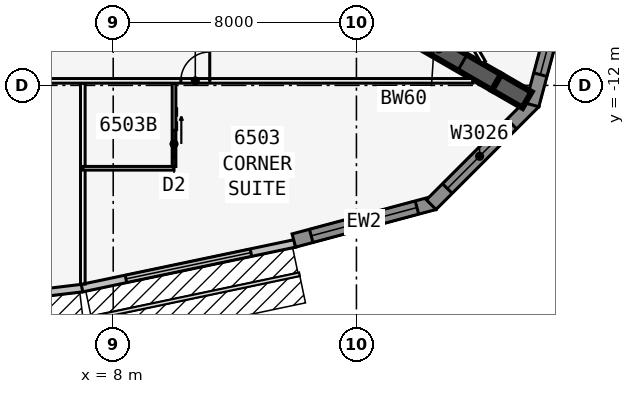
"""IFC4 building model, lengths in metres.
Left out: names, types, materials, properties, quantities, classifications, styles, units other than length and angle.
Written with IfcOpenShell. Run it as: python <this file> out.ifc"""

import sys

from ifc_helpers import new_model, si_unit, direction, frame, frame_2d, origin, place, context, subcontext, project, spatial, polyline, rectangle, outline, extrude, element, fill, save


model = new_model("IFC4")
c1 = context("Model", 3, precision=1e-05, world=origin(), true_north=direction((0.0, 1.0)))
c2 = subcontext(c1, "Body", "Model", "MODEL_VIEW")
j1 = project(units=[si_unit("LENGTHUNIT", "METRE"), si_unit("PLANEANGLEUNIT", "RADIAN")], contexts=[c1])
p1 = place(None, origin())
s1 = spatial("IfcSite", under=j1, at=p1, CompositionType="ELEMENT")
p2 = place(p1, origin())
s2 = spatial("IfcBuilding", under=s1, at=p2, CompositionType="ELEMENT")
p3 = place(p2, frame((0.0, 0.0, 246.5)))
s3 = spatial("IfcBuildingStorey", under=s2, at=p3, CompositionType="ELEMENT", Elevation=246.5)
p4 = place(p3, frame((16.5, -9.526, 0.0), z_axis=(0.0, 0.0, 1.0), x_axis=(0.866031398331, -0.499989616998, 0.0)))
e1 = element("IfcWall", 1, at=p4, inside=s3, PredefinedType="SHEAR", context=c2, shape_type="SweptSolid", body=[
    extrude(rectangle(XDim=4.746, YDim=0.6, at=frame_2d((2.373, 0.0))), origin(), (0.0, 0.0, 1.0), 3.6),
])
p5 = place(p4, frame((1.65, 0.0, 0.0)))
e2 = element("IfcOpeningElement", 2, at=p5, cuts=e1, PredefinedType="OPENING", context=c2, shape_type="SweptSolid", body=[
    extrude(rectangle(XDim=1.8, YDim=2.13, at=frame_2d((0.9, 1.065))), frame((0.0, 0.31, 0.0), z_axis=(0.0, -1.0, 0.0), x_axis=(1.0, 0.0, 0.0)), (0.0, 0.0, 1.0), 0.62),
])
p6 = place(p3, frame((20.61, -11.899, 0.0), z_axis=(0.0, 0.0, 1.0), x_axis=(0.866009537788, -0.500027479704, 0.0)))
e3 = element("IfcWall", 3, at=p6, inside=s3, PredefinedType="SHEAR", context=c2, shape_type="SweptSolid", body=[
    extrude(rectangle(XDim=1.155, YDim=0.6, at=frame_2d((0.577, 0.0))), origin(), (0.0, 0.0, 1.0), 3.6),
])
p7 = place(p3, frame((4.985, -18.906, 0.0), z_axis=(0.0, 0.0, 1.0), x_axis=(0.992877411981, 0.119140441403, 0.0)))
e4 = element("IfcWall", 4, at=p7, inside=s3, PredefinedType="STANDARD", context=c2, shape_type="SweptSolid", body=[
    extrude(rectangle(XDim=2.014, YDim=0.25, at=frame_2d((1.007, 0.0))), origin(), (0.0, 0.0, 1.0), 3.435),
])
p8 = place(p3, frame((6.974, -18.668, 0.0), z_axis=(0.0, 0.0, 1.0), x_axis=(0.978654320409, 0.205513311355, 0.0)))
e5 = element("IfcWall", 5, at=p8, inside=s3, PredefinedType="STANDARD", context=c2, shape_type="SweptSolid", body=[
    extrude(rectangle(XDim=7.153, YDim=0.25, at=frame_2d((3.576, 0.0))), origin(), (0.0, 0.0, 1.0), 3.435),
])
p9 = place(p8, frame((1.476, 0.0, 0.45)))
e6 = element("IfcOpeningElement", 6, at=p9, cuts=e5, PredefinedType="OPENING", context=c2, shape_type="SweptSolid", body=[
    extrude(rectangle(XDim=4.2, YDim=2.6, at=frame_2d((2.1, 1.3))), frame((0.0, 0.135, 0.0), z_axis=(0.0, -1.0, 0.0), x_axis=(1.0, 0.0, 0.0)), (0.0, 0.0, 1.0), 0.27),
])
p10 = place(p3, frame((13.942, -17.103, 0.0), z_axis=(0.0, 0.0, 1.0), x_axis=(0.965913862671, 0.258863689806, 0.0)))
e7 = element("IfcWall", 7, at=p10, inside=s3, PredefinedType="SOLIDWALL", context=c2, shape_type="SweptSolid", body=[
    extrude(rectangle(XDim=4.782, YDim=0.45, at=frame_2d((2.391, 0.0))), origin(), (0.0, 0.0, 1.0), 3.435),
])
p11 = place(p10, frame((0.591, 0.0, 0.45)))
e8 = element("IfcOpeningElement", 8, at=p11, cuts=e7, PredefinedType="OPENING", context=c2, shape_type="SweptSolid", body=[
    extrude(rectangle(XDim=3.6, YDim=2.6, at=frame_2d((1.8, 1.3))), frame((0.0, 0.235, 0.0), z_axis=(0.0, -1.0, 0.0), x_axis=(1.0, 0.0, 0.0)), (0.0, 0.0, 1.0), 0.47),
])
p12 = place(p3, frame((18.46, -15.924, 0.0), z_axis=(0.0, 0.0, 1.0), x_axis=(0.707081252484, 0.707132308968, 0.0)))
e9 = element("IfcWall", 9, at=p12, inside=s3, PredefinedType="SOLIDWALL", context=c2, shape_type="SweptSolid", body=[
    extrude(outline(polyline([(4.782, 0.225), (4.723, 0.225), (4.375, 0.132), (4.351, 0.225), (0.0, 0.225), (0.0, -0.225), (4.782, -0.225), (4.782, 0.225)])), origin(), (0.0, 0.0, 1.0), 3.435),
])
p13 = place(p12, frame((0.75, 0.0, 0.45)))
e10 = element("IfcOpeningElement", 10, at=p13, cuts=e9, PredefinedType="OPENING", context=c2, shape_type="SweptSolid", body=[
    extrude(rectangle(XDim=3.0, YDim=2.6, at=frame_2d((1.5, 1.3))), frame((0.0, 0.235, 0.0), z_axis=(0.0, -1.0, 0.0), x_axis=(1.0, 0.0, 0.0)), (0.0, 0.0, 1.0), 0.47),
])
p14 = place(p3, frame((21.783, -12.644, 0.0), z_axis=(0.0, 0.0, 1.0), x_axis=(0.25880328844, 0.965930048136, 0.0)))
e11 = element("IfcWall", 11, at=p14, inside=s3, PredefinedType="SOLIDWALL", context=c2, shape_type="SweptSolid", body=[
    extrude(outline(polyline([(4.782, 0.225), (0.431, 0.225), (0.406, 0.132), (0.06, 0.225), (0.0, 0.225), (0.0, -0.225), (4.782, -0.225), (4.782, 0.225)])), origin(), (0.0, 0.0, 1.0), 3.435),
])
p15 = place(p14, frame((1.031, 0.0, 0.45)))
e12 = element("IfcOpeningElement", 12, at=p15, cuts=e11, PredefinedType="OPENING", context=c2, shape_type="SweptSolid", body=[
    extrude(rectangle(XDim=3.0, YDim=2.6, at=frame_2d((1.5, 1.3))), frame((0.0, 0.235, 0.0), z_axis=(0.0, -1.0, 0.0), x_axis=(1.0, 0.0, 0.0)), (0.0, 0.0, 1.0), 0.47),
])
p16 = place(p3, frame((-19.827, -11.851, 0.0), z_axis=(0.0, 0.0, 1.0), x_axis=(1.0, 0.0, 0.0)))
e13 = element("IfcWall", 13, at=p16, inside=s3, PredefinedType="PARTITIONING", context=c2, shape_type="SweptSolid", body=[
    extrude(rectangle(XDim=39.654, YDim=0.15, at=frame_2d((19.827, 0.0))), origin(), (0.0, 0.0, 1.0), 3.435),
])
p17 = place(p16, frame((8.652, 0.0, 0.0)))
e14 = element("IfcOpeningElement", 14, at=p17, cuts=e13, PredefinedType="OPENING", context=c2, shape_type="SweptSolid", body=[
    extrude(rectangle(XDim=0.95, YDim=2.13, at=frame_2d((0.475, 1.065))), frame((0.0, 0.085, 0.0), z_axis=(0.0, -1.0, 0.0), x_axis=(1.0, 0.0, 0.0)), (0.0, 0.0, 1.0), 0.17),
])
p18 = place(p16, frame((15.827, 0.0, 0.0)))
e15 = element("IfcOpeningElement", 15, at=p18, cuts=e13, PredefinedType="OPENING", context=c2, shape_type="SweptSolid", body=[
    extrude(rectangle(XDim=1.0, YDim=2.13, at=frame_2d((0.5, 1.065))), frame((0.0, 0.085, 0.0), z_axis=(0.0, -1.0, 0.0), x_axis=(1.0, 0.0, 0.0)), (0.0, 0.0, 1.0), 0.17),
])
p19 = place(p16, frame((23.052, 0.0, 0.0)))
e16 = element("IfcOpeningElement", 16, at=p19, cuts=e13, PredefinedType="OPENING", context=c2, shape_type="SweptSolid", body=[
    extrude(rectangle(XDim=0.95, YDim=2.13, at=frame_2d((0.475, 1.065))), frame((0.0, 0.085, 0.0), z_axis=(0.0, -1.0, 0.0), x_axis=(1.0, 0.0, 0.0)), (0.0, 0.0, 1.0), 0.17),
])
p20 = place(p16, frame((30.052, 0.0, 0.0)))
e17 = element("IfcOpeningElement", 17, at=p20, cuts=e13, PredefinedType="OPENING", context=c2, shape_type="SweptSolid", body=[
    extrude(rectangle(XDim=0.95, YDim=2.13, at=frame_2d((0.475, 1.065))), frame((0.0, 0.085, 0.0), z_axis=(0.0, -1.0, 0.0), x_axis=(1.0, 0.0, 0.0)), (0.0, 0.0, 1.0), 0.17),
])
p21 = place(p3, frame((7.0, -11.926, 0.0), z_axis=(0.0, 0.0, 1.0), x_axis=(0.0, -1.0, 0.0)))
e18 = element("IfcWall", 18, at=p21, inside=s3, PredefinedType="PARTITIONING", context=c2, shape_type="SweptSolid", body=[
    extrude(rectangle(XDim=6.609, YDim=0.15, at=frame_2d((3.304, 0.0))), origin(), (0.0, 0.0, 1.0), 2.678),
])
p22 = place(p3, frame((7.0, -14.726, 0.0), z_axis=(0.0, 0.0, 1.0), x_axis=(1.0, 0.0, 0.0)))
e19 = element("IfcWall", 19, at=p22, inside=s3, PredefinedType="PLUMBINGWALL", context=c2, shape_type="SweptSolid", body=[
    extrude(rectangle(XDim=3.0, YDim=0.12, at=frame_2d((1.5, 0.0))), origin(), (0.0, 0.0, 1.0), 3.435),
])
p23 = place(p3, frame((10.0, -11.926, 0.0), z_axis=(0.0, 0.0, 1.0), x_axis=(0.0, -1.0, 0.0)))
e20 = element("IfcWall", 20, at=p23, inside=s3, PredefinedType="PLUMBINGWALL", context=c2, shape_type="SweptSolid", body=[
    extrude(rectangle(XDim=2.74, YDim=0.12, at=frame_2d((1.37, 0.0))), origin(), (0.0, 0.0, 1.0), 3.435),
])
p24 = place(p23, frame((1.55, 0.0, 0.0)))
e21 = element("IfcOpeningElement", 21, at=p24, cuts=e20, PredefinedType="OPENING", context=c2, shape_type="SweptSolid", body=[
    extrude(rectangle(XDim=0.9, YDim=2.13, at=frame_2d((0.45, 1.065))), frame((0.0, 0.07, 0.0), z_axis=(0.0, -1.0, 0.0), x_axis=(1.0, 0.0, 0.0)), (0.0, 0.0, 1.0), 0.14),
])
p25 = place(p3, frame((20.177, -11.245, 0.0), z_axis=(0.0, 0.0, 1.0), x_axis=(-0.49999979161, 0.866025524098, 0.0)))
e22 = element("IfcWall", 22, at=p25, inside=s3, PredefinedType="PARTITIONING", context=c2, shape_type="SweptSolid", body=[
    extrude(rectangle(XDim=12.827, YDim=0.15, at=frame_2d((6.414, 0.0))), origin(), (0.0, 0.0, 1.0), 3.435),
])
p26 = place(p25, frame((8.652, 0.0, 0.0)))
e23 = element("IfcOpeningElement", 23, at=p26, cuts=e22, PredefinedType="OPENING", context=c2, shape_type="SweptSolid", body=[
    extrude(rectangle(XDim=0.95, YDim=2.13, at=frame_2d((0.475, 1.065))), frame((0.0, 0.085, 0.0), z_axis=(0.0, -1.0, 0.0), x_axis=(1.0, 0.0, 0.0)), (0.0, 0.0, 1.0), 0.17),
])
p27 = place(p9, origin())
e24 = element("IfcWindow", 24, at=p27, inside=s3, PartitioningType="SINGLE_PANEL", PredefinedType="WINDOW", context=c2, shape_type="SweptSolid", body=[
    extrude(rectangle(XDim=4.2, YDim=2.6, at=frame_2d((2.1, 1.3))), frame((0.0, 0.03, 0.0), z_axis=(0.0, -1.0, 0.0), x_axis=(1.0, 0.0, 0.0)), (0.0, 0.0, 1.0), 0.06),
])
fill(e6, e24)
p28 = place(p11, origin())
e25 = element("IfcWindow", 25, at=p28, inside=s3, PartitioningType="SINGLE_PANEL", PredefinedType="WINDOW", context=c2, shape_type="SweptSolid", body=[
    extrude(rectangle(XDim=3.6, YDim=2.6, at=frame_2d((1.8, 1.3))), frame((0.0, 0.03, 0.0), z_axis=(0.0, -1.0, 0.0), x_axis=(1.0, 0.0, 0.0)), (0.0, 0.0, 1.0), 0.06),
])
fill(e8, e25)
p29 = place(p13, origin())
e26 = element("IfcWindow", 26, at=p29, inside=s3, PartitioningType="SINGLE_PANEL", PredefinedType="WINDOW", context=c2, shape_type="SweptSolid", body=[
    extrude(rectangle(XDim=3.0, YDim=2.6, at=frame_2d((1.5, 1.3))), frame((0.0, 0.03, 0.0), z_axis=(0.0, -1.0, 0.0), x_axis=(1.0, 0.0, 0.0)), (0.0, 0.0, 1.0), 0.06),
])
fill(e10, e26)
p30 = place(p15, origin())
e27 = element("IfcWindow", 27, at=p30, inside=s3, PartitioningType="SINGLE_PANEL", PredefinedType="WINDOW", context=c2, shape_type="SweptSolid", body=[
    extrude(rectangle(XDim=3.0, YDim=2.6, at=frame_2d((1.5, 1.3))), frame((0.0, 0.03, 0.0), z_axis=(0.0, -1.0, 0.0), x_axis=(1.0, 0.0, 0.0)), (0.0, 0.0, 1.0), 0.06),
])
fill(e12, e27)
p31 = place(p24, origin())
e28 = element("IfcDoor", 28, at=p31, inside=s3, OperationType="SLIDING_TO_LEFT", PredefinedType="DOOR", context=c2, shape_type="SweptSolid", body=[
    extrude(rectangle(XDim=0.9, YDim=2.13, at=frame_2d((0.45, 1.065))), frame((0.0, 0.025, 0.0), z_axis=(0.0, -1.0, 0.0), x_axis=(1.0, 0.0, 0.0)), (0.0, 0.0, 1.0), 0.05),
])
fill(e21, e28)
p32 = place(p20, origin())
e29 = element("IfcDoor", 29, at=p32, inside=s3, OperationType="SINGLE_SWING_RIGHT", PredefinedType="DOOR", context=c2, shape_type="SweptSolid", body=[
    extrude(rectangle(XDim=0.95, YDim=2.13, at=frame_2d((0.475, 1.065))), frame((0.0, 0.025, 0.0), z_axis=(0.0, -1.0, 0.0), x_axis=(1.0, 0.0, 0.0)), (0.0, 0.0, 1.0), 0.05),
])
fill(e17, e29)
p33 = place(p5, origin())
e30 = element("IfcDoor", 30, at=p33, inside=s3, OperationType="DOUBLE_DOOR_DOUBLE_SWING", PredefinedType="DOOR", context=c2, shape_type="SweptSolid", body=[
    extrude(rectangle(XDim=1.8, YDim=2.13, at=frame_2d((0.9, 1.065))), frame((0.0, 0.025, 0.0), z_axis=(0.0, -1.0, 0.0), x_axis=(1.0, 0.0, 0.0)), (0.0, 0.0, 1.0), 0.05),
])
fill(e2, e30)
save(model, sys.argv[1])
